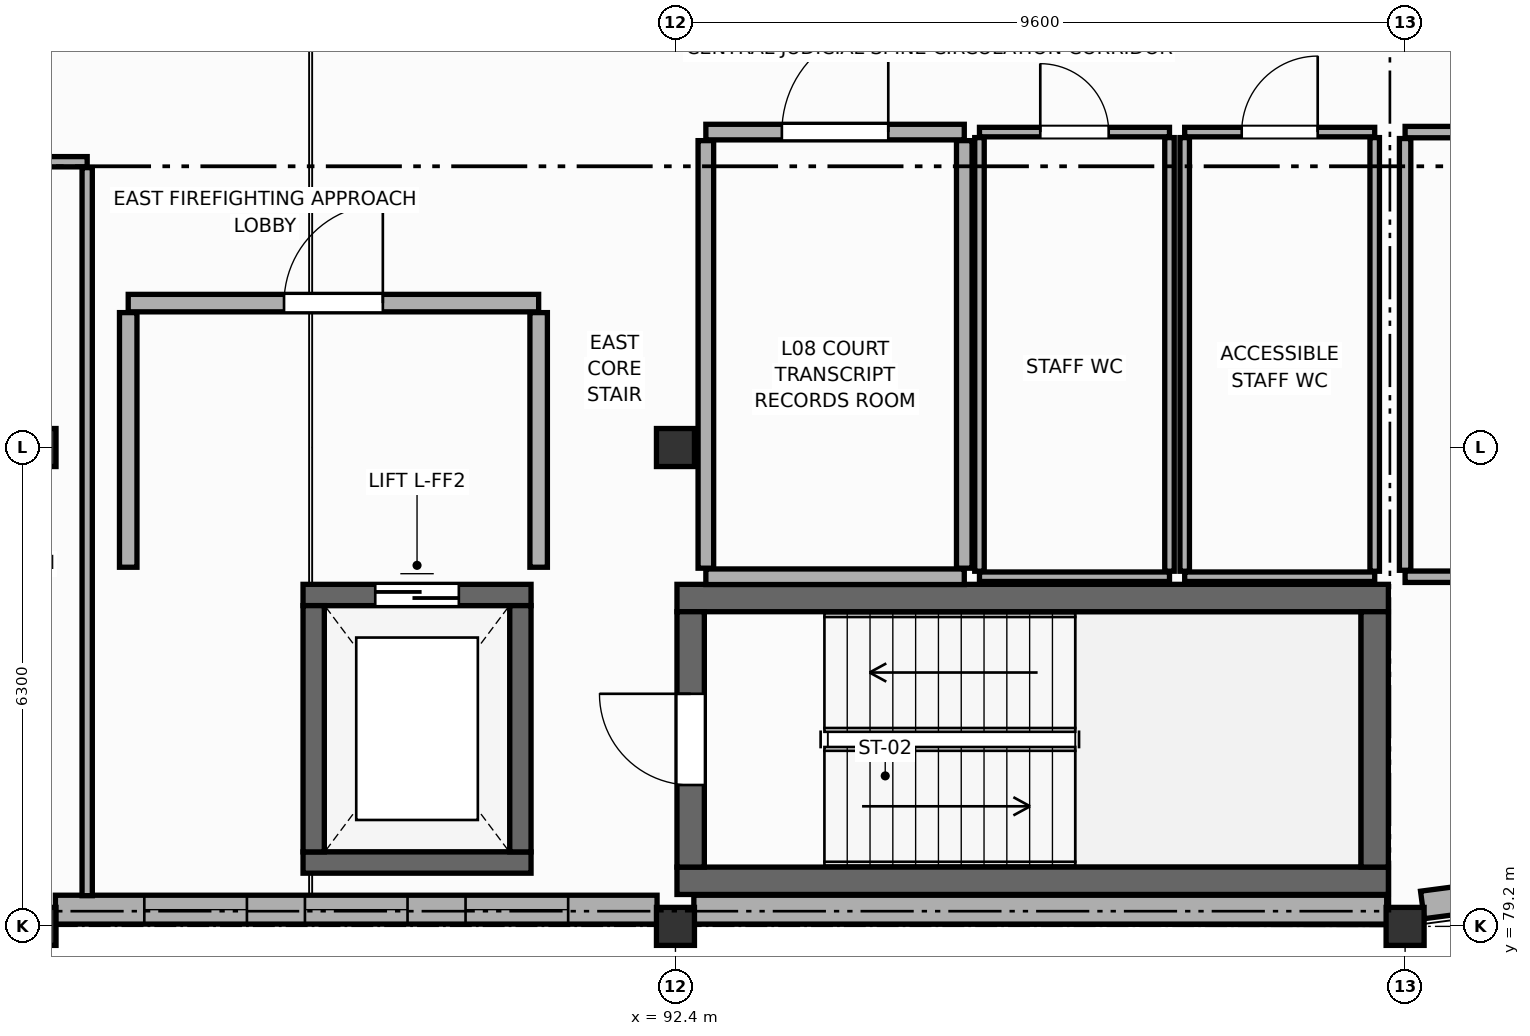
"""IFC4 building model, lengths in metres.
Left out: names, types, materials, properties, quantities, classifications, styles, units other than length and angle.
Written with IfcOpenShell. Run it as: python <this file> out.ifc"""

import sys

from ifc_helpers import new_model, si_unit, direction, frame, frame_2d, origin, origin_2d, place, context, subcontext, project, spatial, rectangle, extrude, element, fill, save


model = new_model("IFC4")
c1 = context("Model", 3, precision=1e-05, world=origin(), true_north=direction((0.0, 1.0)))
c2 = subcontext(c1, "Body", "Model", "MODEL_VIEW")
j1 = project(units=[si_unit("LENGTHUNIT", "METRE"), si_unit("PLANEANGLEUNIT", "RADIAN")], contexts=[c1])
p1 = place(None, origin())
s1 = spatial("IfcSite", under=j1, at=p1, CompositionType="ELEMENT")
p2 = place(p1, origin())
s2 = spatial("IfcBuilding", under=s1, at=p2, CompositionType="ELEMENT")
p3 = place(p2, frame((0.0, 0.0, 31.2)))
s3 = spatial("IfcBuildingStorey", under=s2, at=p3, CompositionType="ELEMENT", Elevation=31.2)
for number, where, z_axis, x_axis in (
    (1, (84.0, 79.2, 0.0), (0.0, 0.0, 1.0), (1.0, 0.0, 0.0)),
    (2, (84.0, 85.5, 0.0), (0.0, 0.0, 1.0), (1.0, 0.0, 0.0)),
    (3, (92.4, 79.2, 0.0), (0.0, 0.0, 1.0), (1.0, 0.0, 0.0)),
    (4, (92.4, 85.5, 0.0), (0.0, 0.0, 1.0), (1.0, 0.0, 0.0)),
    (5, (102.0, 79.2, 0.0), (0.0, 0.0, 1.0), (1.0, 0.0, 0.0)),
):
    element("IfcColumn", number, at=place(p3, frame(where, z_axis=z_axis, x_axis=x_axis)), inside=s3, PredefinedType="COLUMN", context=c2, shape_type="SweptSolid", body=[
        extrude(rectangle(XDim=0.5, YDim=0.5, at=origin_2d()), origin(), (0.0, 0.0, 1.0), 4.2),
    ])
p4 = place(p3, frame((92.158, 79.42, 0.0), z_axis=(0.0, 0.0, 1.0), x_axis=(-1.0, 0.0, 0.0)))
e6 = element("IfcWall", 6, at=p4, inside=s3, PredefinedType="STANDARD", context=c2, shape_type="SweptSolid", body=[
    extrude(rectangle(XDim=7.916, YDim=0.38, at=frame_2d((3.958, 0.0))), origin(), (0.0, 0.0, 1.0), 3.51),
])
p5 = place(p4, frame((1.17, 0.0, 0.85)))
e7 = element("IfcOpeningElement", 7, at=p5, cuts=e6, PredefinedType="OPENING", context=c2, shape_type="SweptSolid", body=[
    extrude(rectangle(XDim=1.35, YDim=1.95, at=frame_2d((0.675, 0.975))), frame((0.0, 0.2, 0.0), z_axis=(0.0, -1.0, 0.0), x_axis=(1.0, 0.0, 0.0)), (0.0, 0.0, 1.0), 0.4),
])
p6 = place(p4, frame((3.283, 0.0, 0.85)))
e8 = element("IfcOpeningElement", 8, at=p6, cuts=e6, PredefinedType="OPENING", context=c2, shape_type="SweptSolid", body=[
    extrude(rectangle(XDim=1.35, YDim=1.95, at=frame_2d((0.675, 0.975))), frame((0.0, 0.2, 0.0), z_axis=(0.0, -1.0, 0.0), x_axis=(1.0, 0.0, 0.0)), (0.0, 0.0, 1.0), 0.4),
])
p7 = place(p4, frame((5.396, 0.0, 0.85)))
e9 = element("IfcOpeningElement", 9, at=p7, cuts=e6, PredefinedType="OPENING", context=c2, shape_type="SweptSolid", body=[
    extrude(rectangle(XDim=1.35, YDim=1.95, at=frame_2d((0.675, 0.975))), frame((0.0, 0.2, 0.0), z_axis=(0.0, -1.0, 0.0), x_axis=(1.0, 0.0, 0.0)), (0.0, 0.0, 1.0), 0.4),
])
p8 = place(p3, frame((101.758, 79.42, 0.0), z_axis=(0.0, 0.0, 1.0), x_axis=(-1.0, 0.0, 0.0)))
e10 = element("IfcWall", 10, at=p8, inside=s3, PredefinedType="STANDARD", context=c2, shape_type="SweptSolid", body=[
    extrude(rectangle(XDim=9.116, YDim=0.38, at=frame_2d((4.558, 0.0))), origin(), (0.0, 0.0, 1.0), 3.11),
])
p9 = place(p3, frame((102.227, 79.482, 0.0), z_axis=(0.0, 0.0, 1.0), x_axis=(0.991440016295, 0.130562988969, 0.0)))
e11 = element("IfcWall", 11, at=p9, inside=s3, PredefinedType="ELEMENTEDWALL", context=c2, shape_type="SweptSolid", body=[
    extrude(rectangle(XDim=3.027, YDim=0.365, at=frame_2d((1.514, 0.0))), origin(), (0.0, 0.0, 1.0), 3.11),
])
p10 = place(p9, frame((1.128, 0.0, 0.85)))
e12 = element("IfcOpeningElement", 12, at=p10, cuts=e11, PredefinedType="OPENING", context=c2, shape_type="SweptSolid", body=[
    extrude(rectangle(XDim=0.8, YDim=1.7, at=frame_2d((0.4, 0.85))), frame((0.0, 0.192, 0.0), z_axis=(0.0, -1.0, 0.0), x_axis=(1.0, 0.0, 0.0)), (0.0, 0.0, 1.0), 0.385),
])
for number, where, z_axis, x_axis in (
    (13, (92.42, 83.52, 0.0), (0.0, 0.0, 1.0), (1.0, 0.0, 0.0)),
    (14, (101.78, 79.8, 0.0), (0.0, 0.0, 1.0), (-1.0, 0.0, 0.0)),
):
    element("IfcWall", number, at=place(p3, frame(where, z_axis=z_axis, x_axis=x_axis)), inside=s3, PredefinedType="SHEAR", context=c2, shape_type="SweptSolid", body=[
        extrude(rectangle(XDim=9.36, YDim=0.36, at=frame_2d((4.68, 0.0))), origin(), (0.0, 0.0, 1.0), 3.98),
    ])
p11 = place(p3, frame((92.6, 79.98, 0.0), z_axis=(0.0, 0.0, 1.0), x_axis=(0.0, 1.0, 0.0)))
e15 = element("IfcWall", 15, at=p11, inside=s3, PredefinedType="SHEAR", context=c2, shape_type="SweptSolid", body=[
    extrude(rectangle(XDim=3.36, YDim=0.36, at=frame_2d((1.68, 0.0))), origin(), (0.0, 0.0, 1.0), 3.98),
])
p12 = place(p11, frame((1.08, 0.0, 0.0)))
e16 = element("IfcOpeningElement", 16, at=p12, cuts=e15, PredefinedType="OPENING", context=c2, shape_type="SweptSolid", body=[
    extrude(rectangle(XDim=1.2, YDim=2.2, at=frame_2d((0.6, 1.1))), frame((0.0, 0.19, 0.0), z_axis=(0.0, -1.0, 0.0), x_axis=(1.0, 0.0, 0.0)), (0.0, 0.0, 1.0), 0.38),
])
p13 = place(p3, frame((101.6, 83.34, 0.0), z_axis=(0.0, 0.0, 1.0), x_axis=(0.0, -1.0, 0.0)))
e17 = element("IfcWall", 17, at=p13, inside=s3, PredefinedType="SHEAR", context=c2, shape_type="SweptSolid", body=[
    extrude(rectangle(XDim=3.36, YDim=0.36, at=frame_2d((1.68, 0.0))), origin(), (0.0, 0.0, 1.0), 3.98),
])
p14 = place(p3, frame((87.5, 83.56, 0.0), z_axis=(0.0, 0.0, 1.0), x_axis=(1.0, 0.0, 0.0)))
e18 = element("IfcWall", 18, at=p14, inside=s3, PredefinedType="SHEAR", context=c2, shape_type="SweptSolid", body=[
    extrude(rectangle(XDim=3.0, YDim=0.28, at=frame_2d((1.5, 0.0))), origin(), (0.0, 0.0, 1.0), 3.98),
])
p15 = place(p14, frame((0.95, 0.0, 0.0)))
e19 = element("IfcOpeningElement", 19, at=p15, cuts=e18, PredefinedType="OPENING", context=c2, shape_type="SweptSolid", body=[
    extrude(rectangle(XDim=1.1, YDim=2.2, at=frame_2d((0.55, 1.1))), frame((0.0, 0.15, 0.0), z_axis=(0.0, -1.0, 0.0), x_axis=(1.0, 0.0, 0.0)), (0.0, 0.0, 1.0), 0.3),
])
p16 = place(p3, frame((90.5, 80.04, 0.0), z_axis=(0.0, 0.0, 1.0), x_axis=(-1.0, 0.0, 0.0)))
e20 = element("IfcWall", 20, at=p16, inside=s3, PredefinedType="SHEAR", context=c2, shape_type="SweptSolid", body=[
    extrude(rectangle(XDim=3.0, YDim=0.28, at=frame_2d((1.5, 0.0))), origin(), (0.0, 0.0, 1.0), 3.98),
])
for number, where, z_axis, x_axis in (
    (21, (87.64, 80.18, 0.0), (0.0, 0.0, 1.0), (0.0, 1.0, 0.0)),
    (22, (90.36, 83.42, 0.0), (0.0, 0.0, 1.0), (0.0, -1.0, 0.0)),
):
    element("IfcWall", number, at=place(p3, frame(where, z_axis=z_axis, x_axis=x_axis)), inside=s3, PredefinedType="SHEAR", context=c2, shape_type="SweptSolid", body=[
        extrude(rectangle(XDim=3.24, YDim=0.28, at=frame_2d((1.62, 0.0))), origin(), (0.0, 0.0, 1.0), 3.98),
    ])
p17 = place(p3, frame((85.2, 87.4, 0.0), z_axis=(0.0, 0.0, 1.0), x_axis=(1.0, 0.0, 0.0)))
e23 = element("IfcWall", 23, at=p17, inside=s3, PredefinedType="STANDARD", context=c2, shape_type="SweptSolid", body=[
    extrude(rectangle(XDim=5.4, YDim=0.23, at=frame_2d((2.7, 0.0))), origin(), (0.0, 0.0, 1.0), 3.965),
])
p18 = place(p17, frame((2.05, 0.0, 0.0)))
e24 = element("IfcOpeningElement", 24, at=p18, cuts=e23, PredefinedType="OPENING", context=c2, shape_type="SweptSolid", body=[
    extrude(rectangle(XDim=1.3, YDim=2.2, at=frame_2d((0.65, 1.1))), frame((0.0, 0.125, 0.0), z_axis=(0.0, -1.0, 0.0), x_axis=(1.0, 0.0, 0.0)), (0.0, 0.0, 1.0), 0.25),
])
for number, where, z_axis, x_axis in (
    (25, (85.2, 83.925, 0.0), (0.0, 0.0, 1.0), (0.0, 1.0, 0.0)),
    (26, (90.6, 87.275, 0.0), (0.0, 0.0, 1.0), (0.0, -1.0, 0.0)),
):
    element("IfcWall", number, at=place(p3, frame(where, z_axis=z_axis, x_axis=x_axis)), inside=s3, PredefinedType="STANDARD", context=c2, shape_type="SweptSolid", body=[
        extrude(rectangle(XDim=3.35, YDim=0.23, at=frame_2d((1.675, 0.0))), origin(), (0.0, 0.0, 1.0), 3.41),
    ])
p19 = place(p3, frame((96.4, 89.65, 0.0), z_axis=(0.0, 0.0, 1.0), x_axis=(1.0, 0.0, 0.0)))
e27 = element("IfcWall", 27, at=p19, inside=s3, PredefinedType="PARTITIONING", context=c2, shape_type="SweptSolid", body=[
    extrude(rectangle(XDim=2.5, YDim=0.125, at=frame_2d((1.25, 0.0))), origin(), (0.0, 0.0, 1.0), 3.965),
])
p20 = place(p19, frame((0.8, 0.0, 0.0)))
e28 = element("IfcOpeningElement", 28, at=p20, cuts=e27, PredefinedType="OPENING", context=c2, shape_type="SweptSolid", body=[
    extrude(rectangle(XDim=0.9, YDim=2.1, at=frame_2d((0.45, 1.05))), frame((0.0, 0.073, 0.0), z_axis=(0.0, -1.0, 0.0), x_axis=(1.0, 0.0, 0.0)), (0.0, 0.0, 1.0), 0.145),
])
p21 = place(p3, frame((98.9, 83.8, 0.0), z_axis=(0.0, 0.0, 1.0), x_axis=(-1.0, 0.0, 0.0)))
e29 = element("IfcWall", 29, at=p21, inside=s3, PredefinedType="PARTITIONING", context=c2, shape_type="SweptSolid", body=[
    extrude(rectangle(XDim=2.5, YDim=0.125, at=frame_2d((1.25, 0.0))), origin(), (0.0, 0.0, 1.0), 3.965),
])
for number, where, z_axis, x_axis in (
    (30, (96.4, 83.873, 0.0), (0.0, 0.0, 1.0), (0.0, 1.0, 0.0)),
    (31, (98.9, 89.577, 0.0), (0.0, 0.0, 1.0), (0.0, -1.0, 0.0)),
):
    element("IfcWall", number, at=place(p3, frame(where, z_axis=z_axis, x_axis=x_axis)), inside=s3, PredefinedType="PARTITIONING", context=c2, shape_type="SweptSolid", body=[
        extrude(rectangle(XDim=5.705, YDim=0.125, at=frame_2d((2.853, 0.0))), origin(), (0.0, 0.0, 1.0), 3.965),
    ])
p22 = place(p3, frame((99.1, 89.65, 0.0), z_axis=(0.0, 0.0, 1.0), x_axis=(1.0, 0.0, 0.0)))
e32 = element("IfcWall", 32, at=p22, inside=s3, PredefinedType="PARTITIONING", context=c2, shape_type="SweptSolid", body=[
    extrude(rectangle(XDim=2.5, YDim=0.125, at=frame_2d((1.25, 0.0))), origin(), (0.0, 0.0, 1.0), 3.11),
])
p23 = place(p22, frame((0.75, 0.0, 0.0)))
e33 = element("IfcOpeningElement", 33, at=p23, cuts=e32, PredefinedType="OPENING", context=c2, shape_type="SweptSolid", body=[
    extrude(rectangle(XDim=1.0, YDim=2.1, at=frame_2d((0.5, 1.05))), frame((0.0, 0.073, 0.0), z_axis=(0.0, -1.0, 0.0), x_axis=(1.0, 0.0, 0.0)), (0.0, 0.0, 1.0), 0.145),
])
p24 = place(p3, frame((101.6, 83.8, 0.0), z_axis=(0.0, 0.0, 1.0), x_axis=(-1.0, 0.0, 0.0)))
e34 = element("IfcWall", 34, at=p24, inside=s3, PredefinedType="PARTITIONING", context=c2, shape_type="SweptSolid", body=[
    extrude(rectangle(XDim=2.5, YDim=0.125, at=frame_2d((1.25, 0.0))), origin(), (0.0, 0.0, 1.0), 3.11),
])
p25 = place(p3, frame((99.1, 83.873, 0.0), z_axis=(0.0, 0.0, 1.0), x_axis=(0.0, 1.0, 0.0)))
e35 = element("IfcWall", 35, at=p25, inside=s3, PredefinedType="PARTITIONING", context=c2, shape_type="SweptSolid", body=[
    extrude(rectangle(XDim=5.705, YDim=0.125, at=frame_2d((2.853, 0.0))), origin(), (0.0, 0.0, 1.0), 3.965),
])
p26 = place(p3, frame((101.6, 89.577, 0.0), z_axis=(0.0, 0.0, 1.0), x_axis=(0.0, -1.0, 0.0)))
e36 = element("IfcWall", 36, at=p26, inside=s3, PredefinedType="PARTITIONING", context=c2, shape_type="SweptSolid", body=[
    extrude(rectangle(XDim=5.705, YDim=0.125, at=frame_2d((2.853, 0.0))), origin(), (0.0, 0.0, 1.0), 3.11),
])
p27 = place(p3, frame((92.8, 89.65, 0.0), z_axis=(0.0, 0.0, 1.0), x_axis=(1.0, 0.0, 0.0)))
e37 = element("IfcWall", 37, at=p27, inside=s3, PredefinedType="STANDARD", context=c2, shape_type="SweptSolid", body=[
    extrude(rectangle(XDim=3.4, YDim=0.205, at=frame_2d((1.7, 0.0))), origin(), (0.0, 0.0, 1.0), 3.965),
])
p28 = place(p27, frame((1.0, 0.0, 0.0)))
e38 = element("IfcOpeningElement", 38, at=p28, cuts=e37, PredefinedType="OPENING", context=c2, shape_type="SweptSolid", body=[
    extrude(rectangle(XDim=1.4, YDim=2.25, at=frame_2d((0.7, 1.125))), frame((0.0, 0.113, 0.0), z_axis=(0.0, -1.0, 0.0), x_axis=(1.0, 0.0, 0.0)), (0.0, 0.0, 1.0), 0.225),
])
p29 = place(p3, frame((96.2, 83.8, 0.0), z_axis=(0.0, 0.0, 1.0), x_axis=(-1.0, 0.0, 0.0)))
e39 = element("IfcWall", 39, at=p29, inside=s3, PredefinedType="STANDARD", context=c2, shape_type="SweptSolid", body=[
    extrude(rectangle(XDim=3.4, YDim=0.205, at=frame_2d((1.7, 0.0))), origin(), (0.0, 0.0, 1.0), 3.965),
])
for number, where, z_axis, x_axis in (
    (40, (92.8, 83.913, 0.0), (0.0, 0.0, 1.0), (0.0, 1.0, 0.0)),
    (41, (96.2, 89.538, 0.0), (0.0, 0.0, 1.0), (0.0, -1.0, 0.0)),
):
    element("IfcWall", number, at=place(p3, frame(where, z_axis=z_axis, x_axis=x_axis)), inside=s3, PredefinedType="STANDARD", context=c2, shape_type="SweptSolid", body=[
        extrude(rectangle(XDim=5.625, YDim=0.205, at=frame_2d((2.812, 0.0))), origin(), (0.0, 0.0, 1.0), 3.965),
    ])
p30 = place(p3, frame((82.036, 89.26, 0.0), z_axis=(0.0, 0.0, 1.0), x_axis=(1.0, 0.0, 0.0)))
e42 = element("IfcWall", 42, at=p30, inside=s3, PredefinedType="PARTITIONING", context=c2, shape_type="SweptSolid", body=[
    extrude(rectangle(XDim=2.624, YDim=0.135, at=frame_2d((1.312, 0.0))), origin(), (0.0, 0.0, 1.0), 3.51),
])
p31 = place(p30, frame((0.837, 0.0, 0.0)))
e43 = element("IfcOpeningElement", 43, at=p31, cuts=e42, PredefinedType="OPENING", context=c2, shape_type="SweptSolid", body=[
    extrude(rectangle(XDim=0.95, YDim=2.15, at=frame_2d((0.475, 1.075))), frame((0.0, 0.077, 0.0), z_axis=(0.0, -1.0, 0.0), x_axis=(1.0, 0.0, 0.0)), (0.0, 0.0, 1.0), 0.155),
])
p32 = place(p3, frame((84.66, 89.183, 0.0), z_axis=(0.0, 0.0, 1.0), x_axis=(0.0, -1.0, 0.0)))
e44 = element("IfcWall", 44, at=p32, inside=s3, PredefinedType="PARTITIONING", context=c2, shape_type="SweptSolid", body=[
    extrude(rectangle(XDim=9.579, YDim=0.135, at=frame_2d((4.789, 0.0))), origin(), (0.0, 0.0, 1.0), 3.41),
])
p33 = place(p3, frame((102.0, 89.65, 0.0), z_axis=(0.0, 0.0, 1.0), x_axis=(1.0, 0.0, 0.0)))
e45 = element("IfcWall", 45, at=p33, inside=s3, PredefinedType="PARTITIONING", context=c2, shape_type="SweptSolid", body=[
    extrude(rectangle(XDim=9.5, YDim=0.15, at=frame_2d((4.75, 0.0))), origin(), (0.0, 0.0, 1.0), 3.01),
])
p34 = place(p33, frame((1.81, 0.0, 0.0)))
e46 = element("IfcOpeningElement", 46, at=p34, cuts=e45, PredefinedType="OPENING", context=c2, shape_type="SweptSolid", body=[
    extrude(rectangle(XDim=1.5, YDim=2.35, at=frame_2d((0.75, 1.175))), frame((0.0, 0.085, 0.0), z_axis=(0.0, -1.0, 0.0), x_axis=(1.0, 0.0, 0.0)), (0.0, 0.0, 1.0), 0.17),
])
p35 = place(p3, frame((111.5, 83.8, 0.0), z_axis=(0.0, 0.0, 1.0), x_axis=(-1.0, 0.0, 0.0)))
e47 = element("IfcWall", 47, at=p35, inside=s3, PredefinedType="PARTITIONING", context=c2, shape_type="SweptSolid", body=[
    extrude(rectangle(XDim=9.5, YDim=0.15, at=frame_2d((4.75, 0.0))), origin(), (0.0, 0.0, 1.0), 3.01),
])
p36 = place(p3, frame((102.0, 83.885, 0.0), z_axis=(0.0, 0.0, 1.0), x_axis=(0.0, 1.0, 0.0)))
e48 = element("IfcWall", 48, at=p36, inside=s3, PredefinedType="PARTITIONING", context=c2, shape_type="SweptSolid", body=[
    extrude(rectangle(XDim=5.68, YDim=0.15, at=frame_2d((2.84, 0.0))), origin(), (0.0, 0.0, 1.0), 3.11),
])
p37 = place(p5, origin())
e49 = element("IfcWindow", 49, at=p37, inside=s3, PartitioningType="SINGLE_PANEL", PredefinedType="WINDOW", context=c2, shape_type="SweptSolid", body=[
    extrude(rectangle(XDim=1.35, YDim=1.95, at=frame_2d((0.675, 0.975))), frame((0.0, 0.03, 0.0), z_axis=(0.0, -1.0, 0.0), x_axis=(1.0, 0.0, 0.0)), (0.0, 0.0, 1.0), 0.06),
])
fill(e7, e49)
p38 = place(p6, origin())
e50 = element("IfcWindow", 50, at=p38, inside=s3, PartitioningType="SINGLE_PANEL", PredefinedType="WINDOW", context=c2, shape_type="SweptSolid", body=[
    extrude(rectangle(XDim=1.35, YDim=1.95, at=frame_2d((0.675, 0.975))), frame((0.0, 0.03, 0.0), z_axis=(0.0, -1.0, 0.0), x_axis=(1.0, 0.0, 0.0)), (0.0, 0.0, 1.0), 0.06),
])
fill(e8, e50)
p39 = place(p7, origin())
e51 = element("IfcWindow", 51, at=p39, inside=s3, PartitioningType="SINGLE_PANEL", PredefinedType="WINDOW", context=c2, shape_type="SweptSolid", body=[
    extrude(rectangle(XDim=1.35, YDim=1.95, at=frame_2d((0.675, 0.975))), frame((0.0, 0.03, 0.0), z_axis=(0.0, -1.0, 0.0), x_axis=(1.0, 0.0, 0.0)), (0.0, 0.0, 1.0), 0.06),
])
fill(e9, e51)
p40 = place(p12, origin())
e52 = element("IfcDoor", 52, at=p40, inside=s3, OperationType="SINGLE_SWING_RIGHT", PredefinedType="DOOR", context=c2, shape_type="SweptSolid", body=[
    extrude(rectangle(XDim=1.2, YDim=2.2, at=frame_2d((0.6, 1.1))), frame((0.0, 0.025, 0.0), z_axis=(0.0, -1.0, 0.0), x_axis=(1.0, 0.0, 0.0)), (0.0, 0.0, 1.0), 0.05),
])
fill(e16, e52)
p41 = place(p15, origin())
e53 = element("IfcDoor", 53, at=p41, inside=s3, OperationType="DOUBLE_DOOR_SLIDING", PredefinedType="DOOR", context=c2, shape_type="SweptSolid", body=[
    extrude(rectangle(XDim=1.1, YDim=2.2, at=frame_2d((0.55, 1.1))), frame((0.0, 0.025, 0.0), z_axis=(0.0, -1.0, 0.0), x_axis=(1.0, 0.0, 0.0)), (0.0, 0.0, 1.0), 0.05),
])
fill(e19, e53)
p42 = place(p18, origin())
e54 = element("IfcDoor", 54, at=p42, inside=s3, OperationType="SINGLE_SWING_RIGHT", PredefinedType="DOOR", context=c2, shape_type="SweptSolid", body=[
    extrude(rectangle(XDim=1.3, YDim=2.2, at=frame_2d((0.65, 1.1))), frame((0.0, 0.025, 0.0), z_axis=(0.0, -1.0, 0.0), x_axis=(1.0, 0.0, 0.0)), (0.0, 0.0, 1.0), 0.05),
])
fill(e24, e54)
p43 = place(p20, origin())
e55 = element("IfcDoor", 55, at=p43, inside=s3, OperationType="SINGLE_SWING_LEFT", PredefinedType="DOOR", context=c2, shape_type="SweptSolid", body=[
    extrude(rectangle(XDim=0.9, YDim=2.1, at=frame_2d((0.45, 1.05))), frame((0.0, 0.025, 0.0), z_axis=(0.0, -1.0, 0.0), x_axis=(1.0, 0.0, 0.0)), (0.0, 0.0, 1.0), 0.05),
])
fill(e28, e55)
p44 = place(p23, origin())
e56 = element("IfcDoor", 56, at=p44, inside=s3, OperationType="SINGLE_SWING_RIGHT", PredefinedType="DOOR", context=c2, shape_type="SweptSolid", body=[
    extrude(rectangle(XDim=1.0, YDim=2.1, at=frame_2d((0.5, 1.05))), frame((0.0, 0.025, 0.0), z_axis=(0.0, -1.0, 0.0), x_axis=(1.0, 0.0, 0.0)), (0.0, 0.0, 1.0), 0.05),
])
fill(e33, e56)
p45 = place(p28, origin())
e57 = element("IfcDoor", 57, at=p45, inside=s3, OperationType="SINGLE_SWING_RIGHT", PredefinedType="DOOR", context=c2, shape_type="SweptSolid", body=[
    extrude(rectangle(XDim=1.4, YDim=2.25, at=frame_2d((0.7, 1.125))), frame((0.0, 0.025, 0.0), z_axis=(0.0, -1.0, 0.0), x_axis=(1.0, 0.0, 0.0)), (0.0, 0.0, 1.0), 0.05),
])
fill(e38, e57)
save(model, sys.argv[1])
